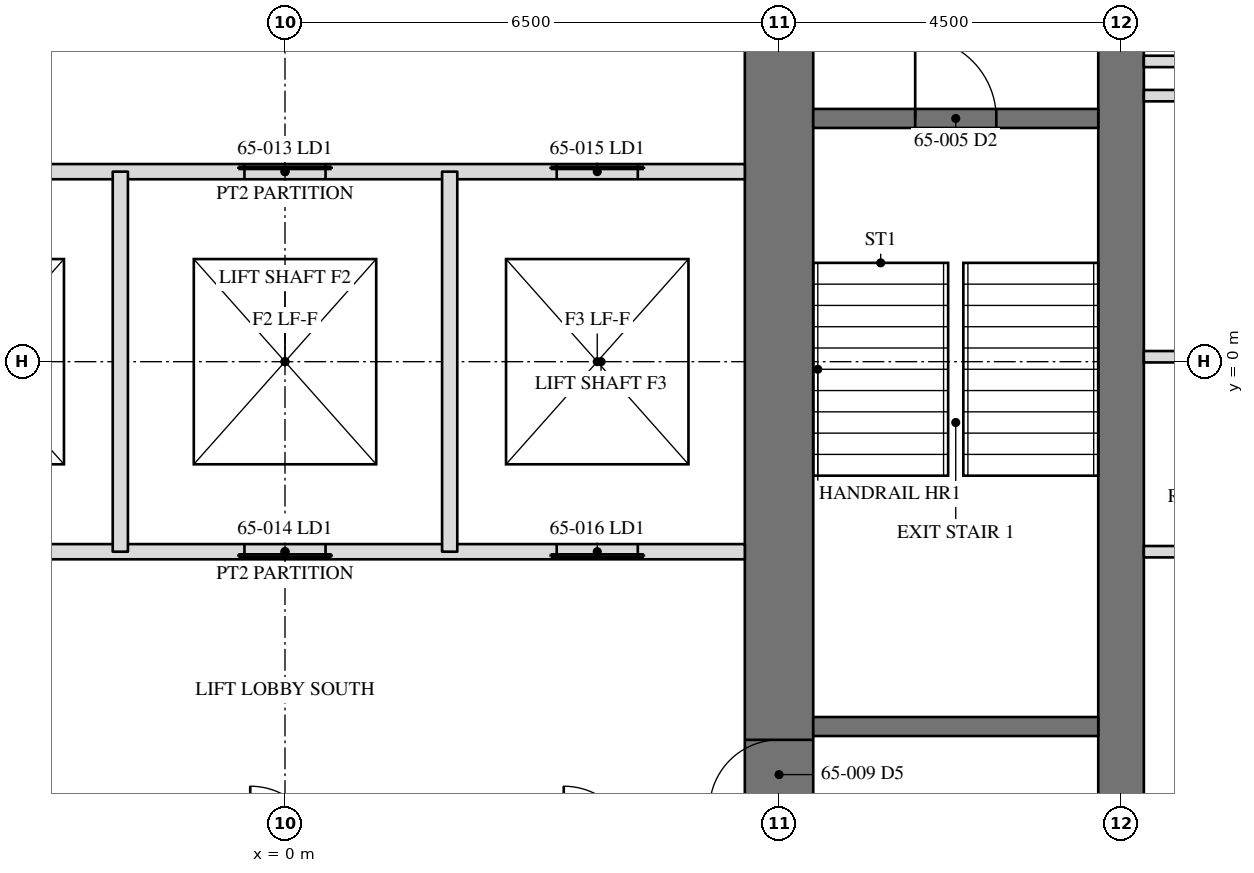
"""IFC4 building model, lengths in metres.
Left out: names, types, materials, properties, quantities, classifications, styles, units other than length and angle.
Written with IfcOpenShell. Run it as: python <this file> out.ifc"""

import sys

from ifc_helpers import new_model, si_unit, direction, frame, frame_2d, origin, place, context, subcontext, project, spatial, rectangle, extrude, element, fill, save


model = new_model("IFC4")
c1 = context("Model", 3, precision=1e-05, world=origin(), true_north=direction((0.0, 1.0)))
c2 = subcontext(c1, "Body", "Model", "MODEL_VIEW")
j1 = project(units=[si_unit("LENGTHUNIT", "METRE"), si_unit("PLANEANGLEUNIT", "RADIAN")], contexts=[c1])
p1 = place(None, origin())
s1 = spatial("IfcSite", under=j1, at=p1, CompositionType="ELEMENT")
p2 = place(p1, origin())
s2 = spatial("IfcBuilding", under=s1, at=p2, CompositionType="ELEMENT")
p3 = place(p2, frame((0.0, 0.0, 266.8)))
s3 = spatial("IfcBuildingStorey", under=s2, at=p3, CompositionType="ELEMENT", Elevation=266.8)
p4 = place(p3, frame((11.0, -11.0, 0.0), z_axis=(0.0, 0.0, 1.0), x_axis=(0.0, 1.0, 0.0)))
e1 = element("IfcWall", 1, at=p4, inside=s3, PredefinedType="SHEAR", context=c2, shape_type="SweptSolid", body=[
    extrude(rectangle(XDim=22.0, YDim=0.6, at=frame_2d((11.0, 0.0))), origin(), (0.0, 0.0, 1.0), 3.6),
])
p5 = place(p4, frame((15.393, 0.0, 0.0)))
e2 = element("IfcOpeningElement", 2, at=p5, cuts=e1, PredefinedType="OPENING", context=c2, shape_type="SweptSolid", body=[
    extrude(rectangle(XDim=0.915, YDim=2.134, at=frame_2d((0.458, 1.067))), frame((0.0, 0.31, 0.0), z_axis=(0.0, -1.0, 0.0), x_axis=(1.0, 0.0, 0.0)), (0.0, 0.0, 1.0), 0.62),
])
p6 = place(p3, frame((6.5, -6.5, 0.0), z_axis=(0.0, 0.0, 1.0), x_axis=(0.0, 1.0, 0.0)))
e3 = element("IfcWall", 3, at=p6, inside=s3, PredefinedType="SHEAR", context=c2, shape_type="SweptSolid", body=[
    extrude(rectangle(XDim=13.0, YDim=0.9, at=frame_2d((6.5, 0.0))), origin(), (0.0, 0.0, 1.0), 3.6),
])
p7 = place(p6, frame((10.893, 0.0, 0.0)))
e4 = element("IfcOpeningElement", 4, at=p7, cuts=e3, PredefinedType="OPENING", context=c2, shape_type="SweptSolid", body=[
    extrude(rectangle(XDim=0.915, YDim=2.134, at=frame_2d((0.458, 1.067))), frame((0.0, 0.46, 0.0), z_axis=(0.0, -1.0, 0.0), x_axis=(1.0, 0.0, 0.0)), (0.0, 0.0, 1.0), 0.92),
])
p8 = place(p6, frame((0.61, 0.0, 0.0)))
e5 = element("IfcOpeningElement", 5, at=p8, cuts=e3, PredefinedType="OPENING", context=c2, shape_type="SweptSolid", body=[
    extrude(rectangle(XDim=0.915, YDim=2.134, at=frame_2d((0.458, 1.067))), frame((0.0, 0.46, 0.0), z_axis=(0.0, -1.0, 0.0), x_axis=(1.0, 0.0, 0.0)), (0.0, 0.0, 1.0), 0.92),
])
p9 = place(p3, frame((6.95, -4.8, 0.0), z_axis=(0.0, 0.0, 1.0), x_axis=(1.0, 0.0, 0.0)))
e6 = element("IfcWall", 6, at=p9, inside=s3, PredefinedType="SOLIDWALL", context=c2, shape_type="SweptSolid", body=[
    extrude(rectangle(XDim=3.75, YDim=0.25, at=frame_2d((1.875, 0.0))), origin(), (0.0, 0.0, 1.0), 3.41),
])
p10 = place(p3, frame((6.95, 3.2, 0.0), z_axis=(0.0, 0.0, 1.0), x_axis=(1.0, 0.0, 0.0)))
e7 = element("IfcWall", 7, at=p10, inside=s3, PredefinedType="SOLIDWALL", context=c2, shape_type="SweptSolid", body=[
    extrude(rectangle(XDim=3.75, YDim=0.25, at=frame_2d((1.875, 0.0))), origin(), (0.0, 0.0, 1.0), 3.41),
])
p11 = place(p10, frame((1.342, 0.0, 0.0)))
e8 = element("IfcOpeningElement", 8, at=p11, cuts=e7, PredefinedType="OPENING", context=c2, shape_type="SweptSolid", body=[
    extrude(rectangle(XDim=1.067, YDim=2.134, at=frame_2d((0.533, 1.067))), frame((0.0, 0.135, 0.0), z_axis=(0.0, -1.0, 0.0), x_axis=(1.0, 0.0, 0.0)), (0.0, 0.0, 1.0), 0.27),
])
p12 = place(p3, frame((-6.05, 2.5, 0.0), z_axis=(0.0, 0.0, 1.0), x_axis=(1.0, 0.0, 0.0)))
e9 = element("IfcWall", 9, at=p12, inside=s3, PredefinedType="PARTITIONING", context=c2, shape_type="SweptSolid", body=[
    extrude(rectangle(XDim=12.1, YDim=0.2, at=frame_2d((6.05, 0.0))), origin(), (0.0, 0.0, 1.0), 3.41),
])
p13 = place(p12, frame((1.408, 0.0, 0.0)))
e10 = element("IfcOpeningElement", 10, at=p13, cuts=e9, PredefinedType="OPENING", context=c2, shape_type="SweptSolid", body=[
    extrude(rectangle(XDim=1.067, YDim=2.134, at=frame_2d((0.533, 1.067))), frame((0.0, 0.11, 0.0), z_axis=(0.0, -1.0, 0.0), x_axis=(1.0, 0.0, 0.0)), (0.0, 0.0, 1.0), 0.22),
])
p14 = place(p12, frame((5.517, 0.0, 0.0)))
e11 = element("IfcOpeningElement", 11, at=p14, cuts=e9, PredefinedType="OPENING", context=c2, shape_type="SweptSolid", body=[
    extrude(rectangle(XDim=1.067, YDim=2.134, at=frame_2d((0.533, 1.067))), frame((0.0, 0.11, 0.0), z_axis=(0.0, -1.0, 0.0), x_axis=(1.0, 0.0, 0.0)), (0.0, 0.0, 1.0), 0.22),
])
p15 = place(p12, frame((9.625, 0.0, 0.0)))
e12 = element("IfcOpeningElement", 12, at=p15, cuts=e9, PredefinedType="OPENING", context=c2, shape_type="SweptSolid", body=[
    extrude(rectangle(XDim=1.067, YDim=2.134, at=frame_2d((0.533, 1.067))), frame((0.0, 0.11, 0.0), z_axis=(0.0, -1.0, 0.0), x_axis=(1.0, 0.0, 0.0)), (0.0, 0.0, 1.0), 0.22),
])
p16 = place(p3, frame((6.05, -2.5, 0.0), z_axis=(0.0, 0.0, 1.0), x_axis=(-1.0, 0.0, 0.0)))
e13 = element("IfcWall", 13, at=p16, inside=s3, PredefinedType="PARTITIONING", context=c2, shape_type="SweptSolid", body=[
    extrude(rectangle(XDim=12.1, YDim=0.2, at=frame_2d((6.05, 0.0))), origin(), (0.0, 0.0, 1.0), 3.41),
])
p17 = place(p16, frame((9.625, 0.0, 0.0)))
e14 = element("IfcOpeningElement", 14, at=p17, cuts=e13, PredefinedType="OPENING", context=c2, shape_type="SweptSolid", body=[
    extrude(rectangle(XDim=1.067, YDim=2.134, at=frame_2d((0.533, 1.067))), frame((0.0, 0.11, 0.0), z_axis=(0.0, -1.0, 0.0), x_axis=(1.0, 0.0, 0.0)), (0.0, 0.0, 1.0), 0.22),
])
p18 = place(p16, frame((5.517, 0.0, 0.0)))
e15 = element("IfcOpeningElement", 15, at=p18, cuts=e13, PredefinedType="OPENING", context=c2, shape_type="SweptSolid", body=[
    extrude(rectangle(XDim=1.067, YDim=2.134, at=frame_2d((0.533, 1.067))), frame((0.0, 0.11, 0.0), z_axis=(0.0, -1.0, 0.0), x_axis=(1.0, 0.0, 0.0)), (0.0, 0.0, 1.0), 0.22),
])
p19 = place(p16, frame((1.408, 0.0, 0.0)))
e16 = element("IfcOpeningElement", 16, at=p19, cuts=e13, PredefinedType="OPENING", context=c2, shape_type="SweptSolid", body=[
    extrude(rectangle(XDim=1.067, YDim=2.134, at=frame_2d((0.533, 1.067))), frame((0.0, 0.11, 0.0), z_axis=(0.0, -1.0, 0.0), x_axis=(1.0, 0.0, 0.0)), (0.0, 0.0, 1.0), 0.22),
])
for number, where, z_axis, x_axis in (
    (17, (-2.167, -2.5, 0.0), (0.0, 0.0, 1.0), (0.0, 1.0, 0.0)),
    (18, (2.167, -2.5, 0.0), (0.0, 0.0, 1.0), (0.0, 1.0, 0.0)),
):
    element("IfcWall", number, at=place(p3, frame(where, z_axis=z_axis, x_axis=x_axis)), inside=s3, PredefinedType="PARTITIONING", context=c2, shape_type="SweptSolid", body=[
        extrude(rectangle(XDim=5.0, YDim=0.2, at=frame_2d((2.5, 0.0))), origin(), (0.0, 0.0, 1.0), 3.41),
    ])
p20 = place(p3, frame((11.3, 0.065, 0.0), z_axis=(0.0, 0.0, 1.0), x_axis=(1.0, 0.0, 0.0)))
e19 = element("IfcWall", 19, at=p20, inside=s3, PredefinedType="PARTITIONING", context=c2, shape_type="SweptSolid", body=[
    extrude(rectangle(XDim=5.615, YDim=0.15, at=frame_2d((2.808, 0.0))), origin(), (0.0, 0.0, 1.0), 2.709),
])
p21 = place(p20, frame((3.242, 0.0, 0.0)))
e20 = element("IfcOpeningElement", 20, at=p21, cuts=e19, PredefinedType="OPENING", context=c2, shape_type="SweptSolid", body=[
    extrude(rectangle(XDim=0.915, YDim=2.134, at=frame_2d((0.458, 1.067))), frame((0.0, 0.085, 0.0), z_axis=(0.0, -1.0, 0.0), x_axis=(1.0, 0.0, 0.0)), (0.0, 0.0, 1.0), 0.17),
])
p22 = place(p3, frame((11.3, 3.95, 0.0), z_axis=(0.0, 0.0, 1.0), x_axis=(1.0, 0.0, 0.0)))
e21 = element("IfcWall", 21, at=p22, inside=s3, PredefinedType="PARTITIONING", context=c2, shape_type="SweptSolid", body=[
    extrude(rectangle(XDim=1.525, YDim=0.15, at=frame_2d((0.762, 0.0))), origin(), (0.0, 0.0, 1.0), 3.41),
])
p23 = place(p3, frame((11.3, 3.5, 0.0), z_axis=(0.0, 0.0, 1.0), x_axis=(1.0, 0.0, 0.0)))
e22 = element("IfcWall", 22, at=p23, inside=s3, PredefinedType="PARTITIONING", context=c2, shape_type="SweptSolid", body=[
    extrude(rectangle(XDim=2.725, YDim=0.15, at=frame_2d((1.362, 0.0))), origin(), (0.0, 0.0, 1.0), 3.41),
])
p24 = place(p3, frame((11.3, -2.5, 0.0), z_axis=(0.0, 0.0, 1.0), x_axis=(1.0, 0.0, 0.0)))
e23 = element("IfcWall", 23, at=p24, inside=s3, PredefinedType="PARTITIONING", context=c2, shape_type="SweptSolid", body=[
    extrude(rectangle(XDim=2.375, YDim=0.15, at=frame_2d((1.188, 0.0))), origin(), (0.0, 0.0, 1.0), 3.41),
])
p25 = place(p11, origin())
e24 = element("IfcDoor", 24, at=p25, inside=s3, OperationType="SINGLE_SWING_LEFT", PredefinedType="DOOR", context=c2, shape_type="SweptSolid", body=[
    extrude(rectangle(XDim=1.067, YDim=2.134, at=frame_2d((0.533, 1.067))), frame((0.0, 0.025, 0.0), z_axis=(0.0, -1.0, 0.0), x_axis=(1.0, 0.0, 0.0)), (0.0, 0.0, 1.0), 0.05),
])
fill(e8, e24)
p26 = place(p8, origin())
e25 = element("IfcDoor", 25, at=p26, inside=s3, OperationType="SINGLE_SWING_RIGHT", PredefinedType="DOOR", context=c2, shape_type="SweptSolid", body=[
    extrude(rectangle(XDim=0.915, YDim=2.134, at=frame_2d((0.458, 1.067))), frame((0.0, -0.375, 0.0), z_axis=(0.0, -1.0, 0.0), x_axis=(1.0, 0.0, 0.0)), (0.0, 0.0, 1.0), 0.05),
])
fill(e5, e25)
p27 = place(p14, origin())
e26 = element("IfcDoor", 26, at=p27, inside=s3, OperationType="SLIDING_TO_LEFT", PredefinedType="DOOR", context=c2, shape_type="SweptSolid", body=[
    extrude(rectangle(XDim=1.067, YDim=2.134, at=frame_2d((0.533, 1.067))), frame((0.0, 0.025, 0.0), z_axis=(0.0, -1.0, 0.0), x_axis=(1.0, 0.0, 0.0)), (0.0, 0.0, 1.0), 0.05),
])
fill(e11, e26)
p28 = place(p18, origin())
e27 = element("IfcDoor", 27, at=p28, inside=s3, OperationType="SLIDING_TO_LEFT", PredefinedType="DOOR", context=c2, shape_type="SweptSolid", body=[
    extrude(rectangle(XDim=1.067, YDim=2.134, at=frame_2d((0.533, 1.067))), frame((0.0, 0.025, 0.0), z_axis=(0.0, -1.0, 0.0), x_axis=(1.0, 0.0, 0.0)), (0.0, 0.0, 1.0), 0.05),
])
fill(e15, e27)
p29 = place(p15, origin())
e28 = element("IfcDoor", 28, at=p29, inside=s3, OperationType="SLIDING_TO_LEFT", PredefinedType="DOOR", context=c2, shape_type="SweptSolid", body=[
    extrude(rectangle(XDim=1.067, YDim=2.134, at=frame_2d((0.533, 1.067))), frame((0.0, 0.025, 0.0), z_axis=(0.0, -1.0, 0.0), x_axis=(1.0, 0.0, 0.0)), (0.0, 0.0, 1.0), 0.05),
])
fill(e12, e28)
p30 = place(p19, origin())
e29 = element("IfcDoor", 29, at=p30, inside=s3, OperationType="SLIDING_TO_LEFT", PredefinedType="DOOR", context=c2, shape_type="SweptSolid", body=[
    extrude(rectangle(XDim=1.067, YDim=2.134, at=frame_2d((0.533, 1.067))), frame((0.0, 0.025, 0.0), z_axis=(0.0, -1.0, 0.0), x_axis=(1.0, 0.0, 0.0)), (0.0, 0.0, 1.0), 0.05),
])
fill(e16, e29)
save(model, sys.argv[1])
